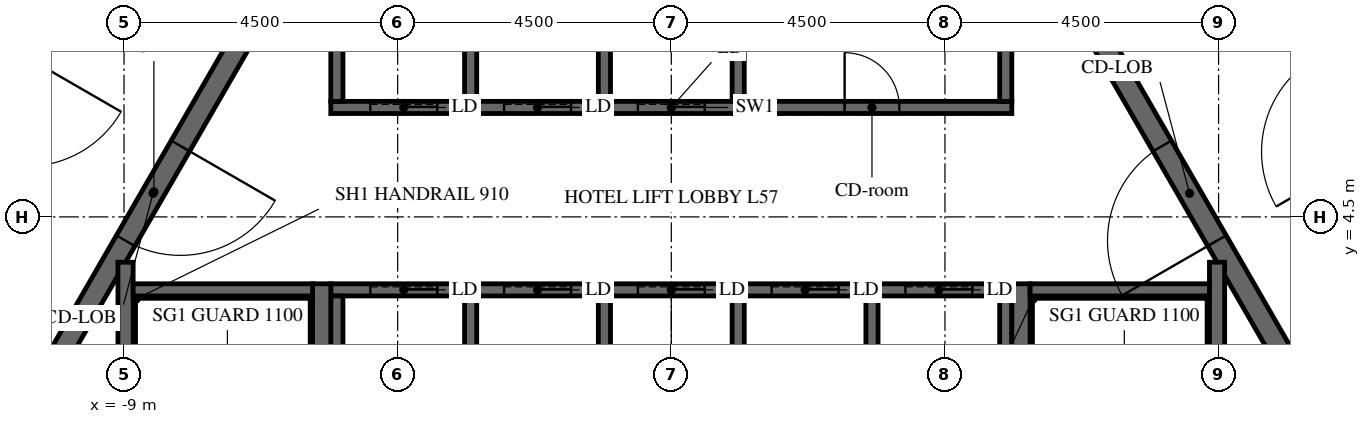
"""IFC4 building model, lengths in metres.
Left out: names, types, materials, properties, quantities, classifications, styles, units other than length and angle.
Written with IfcOpenShell. Run it as: python <this file> out.ifc"""

import sys

from ifc_helpers import new_model, si_unit, direction, frame, frame_2d, origin, place, context, subcontext, project, spatial, polyline, rectangle, outline, extrude, element, fill, save


model = new_model("IFC4")
c1 = context("Model", 3, precision=1e-05, world=origin(), true_north=direction((0.0, 1.0)))
c2 = subcontext(c1, "Body", "Model", "MODEL_VIEW")
j1 = project(units=[si_unit("LENGTHUNIT", "METRE"), si_unit("PLANEANGLEUNIT", "RADIAN")], contexts=[c1])
p1 = place(None, origin())
s1 = spatial("IfcSite", under=j1, at=p1, CompositionType="ELEMENT")
p2 = place(p1, origin())
s2 = spatial("IfcBuilding", under=s1, at=p2, CompositionType="ELEMENT")
p3 = place(p2, frame((0.0, 0.0, 238.5)))
s3 = spatial("IfcBuildingStorey", under=s2, at=p3, CompositionType="ELEMENT", Elevation=238.5)
p4 = place(p3, frame((-7.361, 12.75, -0.15), z_axis=(0.0, 0.0, 1.0), x_axis=(-0.50000571537, -0.866022103989, 0.0)))
e1 = element("IfcWall", 1, at=p4, inside=s3, PredefinedType="SHEAR", context=c2, shape_type="SweptSolid", body=[
    extrude(outline(polyline([(-0.144, -0.25), (14.867, -0.25), (14.578, 0.25), (0.144, 0.25), (-0.144, -0.25)])), origin(), (0.0, 0.0, 1.0), 3.9),
])
p5 = place(p4, frame((6.49, 0.0, 0.15)))
e2 = element("IfcOpeningElement", 2, at=p5, cuts=e1, PredefinedType="OPENING", context=c2, shape_type="SweptSolid", body=[
    extrude(rectangle(XDim=1.8, YDim=2.4, at=frame_2d((0.9, 1.2))), frame((0.0, 0.26, 0.0), z_axis=(0.0, -1.0, 0.0), x_axis=(1.0, 0.0, 0.0)), (0.0, 0.0, 1.0), 0.52),
])
p6 = place(p3, frame((14.722, 0.0, -0.15), z_axis=(0.0, 0.0, 1.0), x_axis=(-0.50000571537, 0.866022103989, 0.0)))
e3 = element("IfcWall", 3, at=p6, inside=s3, PredefinedType="SHEAR", context=c2, shape_type="SweptSolid", body=[
    extrude(outline(polyline([(-0.144, -0.25), (14.867, -0.25), (14.578, 0.25), (0.144, 0.25), (-0.144, -0.25)])), origin(), (0.0, 0.0, 1.0), 3.9),
])
p7 = place(p6, frame((6.432, 0.0, 0.15)))
e4 = element("IfcOpeningElement", 4, at=p7, cuts=e3, PredefinedType="OPENING", context=c2, shape_type="SweptSolid", body=[
    extrude(rectangle(XDim=1.8, YDim=2.4, at=frame_2d((0.9, 1.2))), frame((0.0, 0.26, 0.0), z_axis=(0.0, -1.0, 0.0), x_axis=(1.0, 0.0, 0.0)), (0.0, 0.0, 1.0), 0.52),
])
p8 = place(p3, frame((-5.673, 9.825, -0.15), z_axis=(0.0, 0.0, 1.0), x_axis=(-0.499995046907, -0.866028263435, 0.0)))
e5 = element("IfcWall", 5, at=p8, inside=s3, PredefinedType="SHEAR", context=c2, shape_type="SweptSolid", body=[
    extrude(outline(polyline([(-0.101, -0.175), (11.446, -0.175), (11.244, 0.175), (0.101, 0.175), (-0.101, -0.175)])), origin(), (0.0, 0.0, 1.0), 3.9),
])
p9 = place(p8, frame((4.801, 0.0, 0.15)))
e6 = element("IfcOpeningElement", 6, at=p9, cuts=e5, PredefinedType="OPENING", context=c2, shape_type="SweptSolid", body=[
    extrude(rectangle(XDim=1.8, YDim=2.4, at=frame_2d((0.9, 1.2))), frame((0.0, 0.185, 0.0), z_axis=(0.0, -1.0, 0.0), x_axis=(1.0, 0.0, 0.0)), (0.0, 0.0, 1.0), 0.37),
])
p10 = place(p3, frame((11.345, 0.0, -0.15), z_axis=(0.0, 0.0, 1.0), x_axis=(-0.499995046907, 0.866028263435, 0.0)))
e7 = element("IfcWall", 7, at=p10, inside=s3, PredefinedType="SHEAR", context=c2, shape_type="SweptSolid", body=[
    extrude(outline(polyline([(-0.101, -0.175), (11.446, -0.175), (11.244, 0.175), (0.101, 0.175), (-0.101, -0.175)])), origin(), (0.0, 0.0, 1.0), 3.9),
])
p11 = place(p10, frame((4.744, 0.0, 0.15)))
e8 = element("IfcOpeningElement", 8, at=p11, cuts=e7, PredefinedType="OPENING", context=c2, shape_type="SweptSolid", body=[
    extrude(rectangle(XDim=1.8, YDim=2.4, at=frame_2d((0.9, 1.2))), frame((0.0, 0.185, 0.0), z_axis=(0.0, -1.0, 0.0), x_axis=(1.0, 0.0, 0.0)), (0.0, 0.0, 1.0), 0.37),
])
p12 = place(p3, frame((-5.6, 6.3, -0.25), z_axis=(0.0, 0.0, 1.0), x_axis=(1.0, 0.0, 0.0)))
e9 = element("IfcWall", 9, at=p12, inside=s3, PredefinedType="SHEAR", context=c2, shape_type="SweptSolid", body=[
    extrude(rectangle(XDim=11.2, YDim=0.2, at=frame_2d((5.6, 0.0))), origin(), (0.0, 0.0, 1.0), 3.9),
])
p13 = place(p12, frame((8.45, 0.0, 0.25)))
e10 = element("IfcOpeningElement", 10, at=p13, cuts=e9, PredefinedType="OPENING", context=c2, shape_type="SweptSolid", body=[
    extrude(rectangle(XDim=0.9, YDim=2.1, at=frame_2d((0.45, 1.05))), frame((0.0, 0.11, 0.0), z_axis=(0.0, -1.0, 0.0), x_axis=(1.0, 0.0, 0.0)), (0.0, 0.0, 1.0), 0.22),
])
p14 = place(p12, frame((0.65, 0.0, 0.25)))
e11 = element("IfcOpeningElement", 11, at=p14, cuts=e9, PredefinedType="OPENING", context=c2, shape_type="SweptSolid", body=[
    extrude(rectangle(XDim=1.1, YDim=2.1, at=frame_2d((0.55, 1.05))), frame((0.0, 0.11, 0.0), z_axis=(0.0, -1.0, 0.0), x_axis=(1.0, 0.0, 0.0)), (0.0, 0.0, 1.0), 0.22),
])
p15 = place(p12, frame((2.85, 0.0, 0.25)))
e12 = element("IfcOpeningElement", 12, at=p15, cuts=e9, PredefinedType="OPENING", context=c2, shape_type="SweptSolid", body=[
    extrude(rectangle(XDim=1.1, YDim=2.1, at=frame_2d((0.55, 1.05))), frame((0.0, 0.11, 0.0), z_axis=(0.0, -1.0, 0.0), x_axis=(1.0, 0.0, 0.0)), (0.0, 0.0, 1.0), 0.22),
])
p16 = place(p12, frame((5.05, 0.0, 0.25)))
e13 = element("IfcOpeningElement", 13, at=p16, cuts=e9, PredefinedType="OPENING", context=c2, shape_type="SweptSolid", body=[
    extrude(rectangle(XDim=1.1, YDim=2.1, at=frame_2d((0.55, 1.05))), frame((0.0, 0.11, 0.0), z_axis=(0.0, -1.0, 0.0), x_axis=(1.0, 0.0, 0.0)), (0.0, 0.0, 1.0), 0.22),
])
for number, where, z_axis, x_axis in (
    (14, (-5.5, 6.4, -0.25), (0.0, 0.0, 1.0), (0.0, 1.0, 0.0)),
    (15, (-3.3, 6.4, -0.25), (0.0, 0.0, 1.0), (0.0, 1.0, 0.0)),
    (16, (-1.1, 6.4, -0.25), (0.0, 0.0, 1.0), (0.0, 1.0, 0.0)),
    (17, (1.1, 6.4, -0.25), (0.0, 0.0, 1.0), (0.0, 1.0, 0.0)),
    (18, (5.5, 6.4, -0.25), (0.0, 0.0, 1.0), (0.0, 1.0, 0.0)),
):
    element("IfcWall", number, at=place(p3, frame(where, z_axis=z_axis, x_axis=x_axis)), inside=s3, PredefinedType="SHEAR", context=c2, shape_type="SweptSolid", body=[
        extrude(rectangle(XDim=2.9, YDim=0.2, at=frame_2d((1.45, 0.0))), origin(), (0.0, 0.0, 1.0), 3.9),
    ])
p17 = place(p3, frame((-5.6, 3.3, -0.25), z_axis=(0.0, 0.0, 1.0), x_axis=(1.0, 0.0, 0.0)))
e19 = element("IfcWall", 19, at=p17, inside=s3, PredefinedType="SHEAR", context=c2, shape_type="SweptSolid", body=[
    extrude(rectangle(XDim=11.2, YDim=0.2, at=frame_2d((5.6, 0.0))), origin(), (0.0, 0.0, 1.0), 3.9),
])
p18 = place(p17, frame((0.65, 0.0, 0.25)))
e20 = element("IfcOpeningElement", 20, at=p18, cuts=e19, PredefinedType="OPENING", context=c2, shape_type="SweptSolid", body=[
    extrude(rectangle(XDim=1.1, YDim=2.1, at=frame_2d((0.55, 1.05))), frame((0.0, 0.11, 0.0), z_axis=(0.0, -1.0, 0.0), x_axis=(1.0, 0.0, 0.0)), (0.0, 0.0, 1.0), 0.22),
])
p19 = place(p17, frame((2.85, 0.0, 0.25)))
e21 = element("IfcOpeningElement", 21, at=p19, cuts=e19, PredefinedType="OPENING", context=c2, shape_type="SweptSolid", body=[
    extrude(rectangle(XDim=1.1, YDim=2.1, at=frame_2d((0.55, 1.05))), frame((0.0, 0.11, 0.0), z_axis=(0.0, -1.0, 0.0), x_axis=(1.0, 0.0, 0.0)), (0.0, 0.0, 1.0), 0.22),
])
p20 = place(p17, frame((5.05, 0.0, 0.25)))
e22 = element("IfcOpeningElement", 22, at=p20, cuts=e19, PredefinedType="OPENING", context=c2, shape_type="SweptSolid", body=[
    extrude(rectangle(XDim=1.1, YDim=2.1, at=frame_2d((0.55, 1.05))), frame((0.0, 0.11, 0.0), z_axis=(0.0, -1.0, 0.0), x_axis=(1.0, 0.0, 0.0)), (0.0, 0.0, 1.0), 0.22),
])
p21 = place(p17, frame((7.25, 0.0, 0.25)))
e23 = element("IfcOpeningElement", 23, at=p21, cuts=e19, PredefinedType="OPENING", context=c2, shape_type="SweptSolid", body=[
    extrude(rectangle(XDim=1.1, YDim=2.1, at=frame_2d((0.55, 1.05))), frame((0.0, 0.11, 0.0), z_axis=(0.0, -1.0, 0.0), x_axis=(1.0, 0.0, 0.0)), (0.0, 0.0, 1.0), 0.22),
])
p22 = place(p17, frame((9.45, 0.0, 0.25)))
e24 = element("IfcOpeningElement", 24, at=p22, cuts=e19, PredefinedType="OPENING", context=c2, shape_type="SweptSolid", body=[
    extrude(rectangle(XDim=1.1, YDim=2.1, at=frame_2d((0.55, 1.05))), frame((0.0, 0.11, 0.0), z_axis=(0.0, -1.0, 0.0), x_axis=(1.0, 0.0, 0.0)), (0.0, 0.0, 1.0), 0.22),
])
for number, where, z_axis, x_axis in (
    (25, (-5.5, 0.1, -0.25), (0.0, 0.0, 1.0), (0.0, 1.0, 0.0)),
    (26, (-3.3, 0.1, -0.25), (0.0, 0.0, 1.0), (0.0, 1.0, 0.0)),
    (27, (-1.1, 0.1, -0.25), (0.0, 0.0, 1.0), (0.0, 1.0, 0.0)),
    (28, (1.1, 0.1, -0.25), (0.0, 0.0, 1.0), (0.0, 1.0, 0.0)),
    (29, (3.3, 0.1, -0.25), (0.0, 0.0, 1.0), (0.0, 1.0, 0.0)),
    (30, (5.5, 0.1, -0.25), (0.0, 0.0, 1.0), (0.0, 1.0, 0.0)),
):
    element("IfcWall", number, at=place(p3, frame(where, z_axis=z_axis, x_axis=x_axis)), inside=s3, PredefinedType="SHEAR", context=c2, shape_type="SweptSolid", body=[
        extrude(rectangle(XDim=3.1, YDim=0.2, at=frame_2d((1.55, 0.0))), origin(), (0.0, 0.0, 1.0), 3.9),
    ])
p23 = place(p3, frame((5.75, -3.4, -0.25), z_axis=(0.0, 0.0, 1.0), x_axis=(0.0, 1.0, 0.0)))
e31 = element("IfcWall", 31, at=p23, inside=s3, PredefinedType="SHEAR", context=c2, shape_type="SweptSolid", body=[
    extrude(rectangle(XDim=6.8, YDim=0.3, at=frame_2d((3.4, 0.0))), origin(), (0.0, 0.0, 1.0), 3.9),
])
p24 = place(p3, frame((8.975, -3.755, -0.25), z_axis=(0.0, 0.0, 1.0), x_axis=(0.0, 1.0, 0.0)))
e32 = element("IfcWall", 32, at=p24, inside=s3, PredefinedType="SHEAR", context=c2, shape_type="SweptSolid", body=[
    extrude(rectangle(XDim=7.51, YDim=0.25, at=frame_2d((3.755, 0.0))), origin(), (0.0, 0.0, 1.0), 3.9),
])
p25 = place(p3, frame((5.9, 3.3, -0.25), z_axis=(0.0, 0.0, 1.0), x_axis=(1.0, 0.0, 0.0)))
e33 = element("IfcWall", 33, at=p25, inside=s3, PredefinedType="SHEAR", context=c2, shape_type="SweptSolid", body=[
    extrude(rectangle(XDim=2.95, YDim=0.2, at=frame_2d((1.475, 0.0))), origin(), (0.0, 0.0, 1.0), 3.9),
])
p26 = place(p3, frame((-5.75, -3.4, -0.25), z_axis=(0.0, 0.0, 1.0), x_axis=(0.0, 1.0, 0.0)))
e34 = element("IfcWall", 34, at=p26, inside=s3, PredefinedType="SHEAR", context=c2, shape_type="SweptSolid", body=[
    extrude(rectangle(XDim=6.8, YDim=0.3, at=frame_2d((3.4, 0.0))), origin(), (0.0, 0.0, 1.0), 3.9),
])
p27 = place(p3, frame((-8.975, -3.755, -0.25), z_axis=(0.0, 0.0, 1.0), x_axis=(0.0, 1.0, 0.0)))
e35 = element("IfcWall", 35, at=p27, inside=s3, PredefinedType="SHEAR", context=c2, shape_type="SweptSolid", body=[
    extrude(rectangle(XDim=7.51, YDim=0.25, at=frame_2d((3.755, 0.0))), origin(), (0.0, 0.0, 1.0), 3.9),
])
p28 = place(p3, frame((-8.85, 3.3, -0.25), z_axis=(0.0, 0.0, 1.0), x_axis=(1.0, 0.0, 0.0)))
e36 = element("IfcWall", 36, at=p28, inside=s3, PredefinedType="SHEAR", context=c2, shape_type="SweptSolid", body=[
    extrude(rectangle(XDim=2.95, YDim=0.2, at=frame_2d((1.475, 0.0))), origin(), (0.0, 0.0, 1.0), 3.9),
])
p29 = place(p3, frame((-8.673, 14.978, 0.0), z_axis=(0.0, 0.0, 1.0), x_axis=(-0.50000700621, -0.86602135871, 0.0)))
e37 = element("IfcWall", 37, at=p29, inside=s3, PredefinedType="PARTITIONING", context=c2, shape_type="SweptSolid", body=[
    extrude(rectangle(XDim=14.928, YDim=0.15, at=frame_2d((7.464, 0.0))), origin(), (0.0, 0.0, 1.0), 2.838),
])
p30 = place(p29, frame((4.454, 0.0, 0.0)))
e38 = element("IfcOpeningElement", 38, at=p30, cuts=e37, PredefinedType="OPENING", context=c2, shape_type="SweptSolid", body=[
    extrude(rectangle(XDim=1.0, YDim=2.1, at=frame_2d((0.5, 1.05))), frame((0.0, 0.085, 0.0), z_axis=(0.0, -1.0, 0.0), x_axis=(1.0, 0.0, 0.0)), (0.0, 0.0, 1.0), 0.17),
])
p31 = place(p29, frame((11.264, 0.0, 0.0)))
e39 = element("IfcOpeningElement", 39, at=p31, cuts=e37, PredefinedType="OPENING", context=c2, shape_type="SweptSolid", body=[
    extrude(rectangle(XDim=1.0, YDim=2.1, at=frame_2d((0.5, 1.05))), frame((0.0, 0.085, 0.0), z_axis=(0.0, -1.0, 0.0), x_axis=(1.0, 0.0, 0.0)), (0.0, 0.0, 1.0), 0.17),
])
p32 = place(p3, frame((17.277, 0.075, 0.0), z_axis=(0.0, 0.0, 1.0), x_axis=(-0.499998228944, 0.866026426302, 0.0)))
e40 = element("IfcWall", 40, at=p32, inside=s3, PredefinedType="PARTITIONING", context=c2, shape_type="SweptSolid", body=[
    extrude(rectangle(XDim=14.867, YDim=0.15, at=frame_2d((7.433, 0.0))), origin(), (0.0, 0.0, 1.0), 2.838),
])
p33 = place(p32, frame((4.345, 0.0, 0.0)))
e41 = element("IfcOpeningElement", 41, at=p33, cuts=e40, PredefinedType="OPENING", context=c2, shape_type="SweptSolid", body=[
    extrude(rectangle(XDim=1.0, YDim=2.1, at=frame_2d((0.5, 1.05))), frame((0.0, 0.085, 0.0), z_axis=(0.0, -1.0, 0.0), x_axis=(1.0, 0.0, 0.0)), (0.0, 0.0, 1.0), 0.17),
])
p34 = place(p32, frame((8.51, 0.0, 0.0)))
e42 = element("IfcOpeningElement", 42, at=p34, cuts=e40, PredefinedType="OPENING", context=c2, shape_type="SweptSolid", body=[
    extrude(rectangle(XDim=1.0, YDim=2.1, at=frame_2d((0.5, 1.05))), frame((0.0, 0.085, 0.0), z_axis=(0.0, -1.0, 0.0), x_axis=(1.0, 0.0, 0.0)), (0.0, 0.0, 1.0), 0.17),
])
p35 = place(p9, origin())
e43 = element("IfcDoor", 43, at=p35, inside=s3, OperationType="DOUBLE_DOOR_SINGLE_SWING", PredefinedType="DOOR", context=c2, shape_type="SweptSolid", body=[
    extrude(rectangle(XDim=1.8, YDim=2.4, at=frame_2d((0.9, 1.2))), frame((0.0, 0.025, 0.0), z_axis=(0.0, -1.0, 0.0), x_axis=(1.0, 0.0, 0.0)), (0.0, 0.0, 1.0), 0.05),
])
fill(e6, e43)
p36 = place(p11, origin())
e44 = element("IfcDoor", 44, at=p36, inside=s3, OperationType="DOUBLE_DOOR_SINGLE_SWING", PredefinedType="DOOR", context=c2, shape_type="SweptSolid", body=[
    extrude(rectangle(XDim=1.8, YDim=2.4, at=frame_2d((0.9, 1.2))), frame((0.0, 0.025, 0.0), z_axis=(0.0, -1.0, 0.0), x_axis=(1.0, 0.0, 0.0)), (0.0, 0.0, 1.0), 0.05),
])
fill(e8, e44)
p37 = place(p13, origin())
e45 = element("IfcDoor", 45, at=p37, inside=s3, OperationType="SINGLE_SWING_LEFT", PredefinedType="DOOR", context=c2, shape_type="SweptSolid", body=[
    extrude(rectangle(XDim=0.9, YDim=2.1, at=frame_2d((0.45, 1.05))), frame((0.0, 0.025, 0.0), z_axis=(0.0, -1.0, 0.0), x_axis=(1.0, 0.0, 0.0)), (0.0, 0.0, 1.0), 0.05),
])
fill(e10, e45)
p38 = place(p14, origin())
e46 = element("IfcDoor", 46, at=p38, inside=s3, OperationType="SLIDING_TO_LEFT", PredefinedType="DOOR", context=c2, shape_type="SweptSolid", body=[
    extrude(rectangle(XDim=1.1, YDim=2.1, at=frame_2d((0.55, 1.05))), frame((0.0, 0.025, 0.0), z_axis=(0.0, -1.0, 0.0), x_axis=(1.0, 0.0, 0.0)), (0.0, 0.0, 1.0), 0.05),
])
fill(e11, e46)
p39 = place(p15, origin())
e47 = element("IfcDoor", 47, at=p39, inside=s3, OperationType="SLIDING_TO_LEFT", PredefinedType="DOOR", context=c2, shape_type="SweptSolid", body=[
    extrude(rectangle(XDim=1.1, YDim=2.1, at=frame_2d((0.55, 1.05))), frame((0.0, 0.025, 0.0), z_axis=(0.0, -1.0, 0.0), x_axis=(1.0, 0.0, 0.0)), (0.0, 0.0, 1.0), 0.05),
])
fill(e12, e47)
p40 = place(p16, origin())
e48 = element("IfcDoor", 48, at=p40, inside=s3, OperationType="SLIDING_TO_LEFT", PredefinedType="DOOR", context=c2, shape_type="SweptSolid", body=[
    extrude(rectangle(XDim=1.1, YDim=2.1, at=frame_2d((0.55, 1.05))), frame((0.0, 0.025, 0.0), z_axis=(0.0, -1.0, 0.0), x_axis=(1.0, 0.0, 0.0)), (0.0, 0.0, 1.0), 0.05),
])
fill(e13, e48)
p41 = place(p18, origin())
e49 = element("IfcDoor", 49, at=p41, inside=s3, OperationType="SLIDING_TO_LEFT", PredefinedType="DOOR", context=c2, shape_type="SweptSolid", body=[
    extrude(rectangle(XDim=1.1, YDim=2.1, at=frame_2d((0.55, 1.05))), frame((0.0, 0.025, 0.0), z_axis=(0.0, -1.0, 0.0), x_axis=(1.0, 0.0, 0.0)), (0.0, 0.0, 1.0), 0.05),
])
fill(e20, e49)
p42 = place(p19, origin())
e50 = element("IfcDoor", 50, at=p42, inside=s3, OperationType="SLIDING_TO_LEFT", PredefinedType="DOOR", context=c2, shape_type="SweptSolid", body=[
    extrude(rectangle(XDim=1.1, YDim=2.1, at=frame_2d((0.55, 1.05))), frame((0.0, 0.025, 0.0), z_axis=(0.0, -1.0, 0.0), x_axis=(1.0, 0.0, 0.0)), (0.0, 0.0, 1.0), 0.05),
])
fill(e21, e50)
p43 = place(p20, origin())
e51 = element("IfcDoor", 51, at=p43, inside=s3, OperationType="SLIDING_TO_LEFT", PredefinedType="DOOR", context=c2, shape_type="SweptSolid", body=[
    extrude(rectangle(XDim=1.1, YDim=2.1, at=frame_2d((0.55, 1.05))), frame((0.0, 0.025, 0.0), z_axis=(0.0, -1.0, 0.0), x_axis=(1.0, 0.0, 0.0)), (0.0, 0.0, 1.0), 0.05),
])
fill(e22, e51)
p44 = place(p21, origin())
e52 = element("IfcDoor", 52, at=p44, inside=s3, OperationType="SLIDING_TO_LEFT", PredefinedType="DOOR", context=c2, shape_type="SweptSolid", body=[
    extrude(rectangle(XDim=1.1, YDim=2.1, at=frame_2d((0.55, 1.05))), frame((0.0, 0.025, 0.0), z_axis=(0.0, -1.0, 0.0), x_axis=(1.0, 0.0, 0.0)), (0.0, 0.0, 1.0), 0.05),
])
fill(e23, e52)
p45 = place(p22, origin())
e53 = element("IfcDoor", 53, at=p45, inside=s3, OperationType="SLIDING_TO_LEFT", PredefinedType="DOOR", context=c2, shape_type="SweptSolid", body=[
    extrude(rectangle(XDim=1.1, YDim=2.1, at=frame_2d((0.55, 1.05))), frame((0.0, 0.025, 0.0), z_axis=(0.0, -1.0, 0.0), x_axis=(1.0, 0.0, 0.0)), (0.0, 0.0, 1.0), 0.05),
])
fill(e24, e53)
save(model, sys.argv[1])
